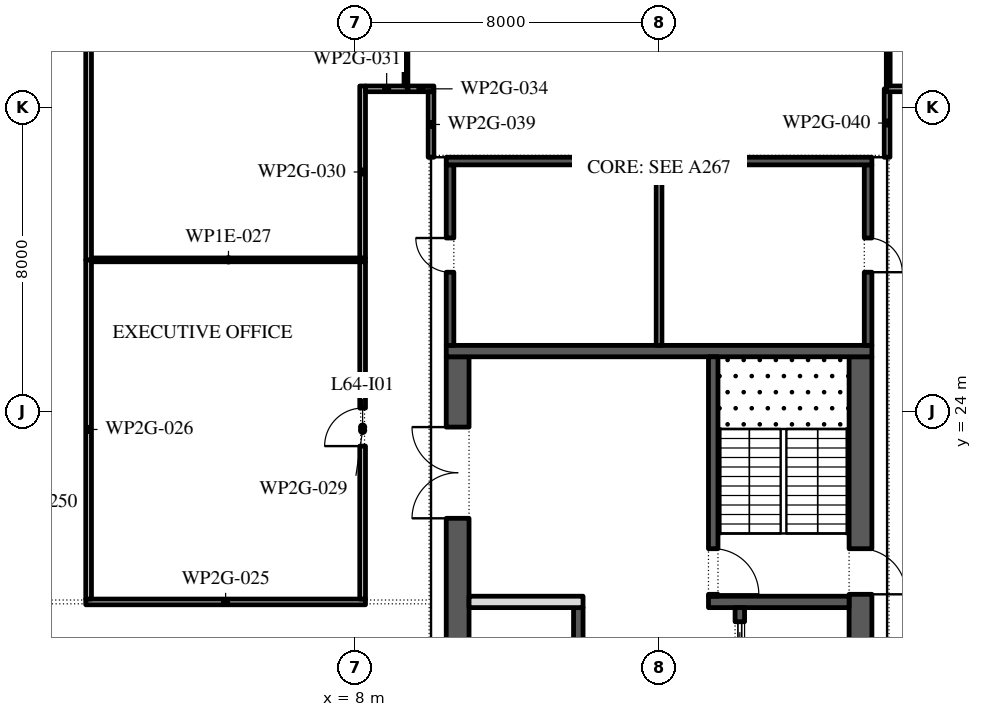
"""IFC4 building model, lengths in metres.
Left out: names, types, materials, properties, quantities, classifications, styles, units other than length and angle.
Written with IfcOpenShell. Run it as: python <this file> out.ifc"""

import sys

from ifc_helpers import new_model, si_unit, direction, frame, frame_2d, origin, place, context, subcontext, project, spatial, rectangle, extrude, element, fill, save


model = new_model("IFC4")
c1 = context("Model", 3, precision=1e-05, world=origin(), true_north=direction((0.0, 1.0)))
c2 = subcontext(c1, "Body", "Model", "MODEL_VIEW")
j1 = project(units=[si_unit("LENGTHUNIT", "METRE"), si_unit("PLANEANGLEUNIT", "RADIAN")], contexts=[c1])
p1 = place(None, origin())
s1 = spatial("IfcSite", under=j1, at=p1, CompositionType="ELEMENT")
p2 = place(p1, origin())
s2 = spatial("IfcBuilding", under=s1, at=p2, CompositionType="ELEMENT")
p3 = place(p2, frame((0.0, 0.0, 293.4)))
s3 = spatial("IfcBuildingStorey", under=s2, at=p3, CompositionType="ELEMENT", Elevation=293.4)
p4 = place(p3, frame((21.359, -11.678, 0.0), z_axis=(0.0, 0.0, 1.0), x_axis=(0.224949198343, 0.974370493275, 0.0)))
e1 = element("IfcWall", 1, at=p4, inside=s3, PredefinedType="STANDARD", context=c2, shape_type="SweptSolid", body=[
    extrude(rectangle(XDim=49.5, YDim=0.3, at=frame_2d((24.75, 0.0))), origin(), (0.0, 0.0, 1.0), 3.75),
])
p5 = place(p4, frame((0.907, 0.0, 0.45)))
e2 = element("IfcOpeningElement", 2, at=p5, cuts=e1, PredefinedType="OPENING", context=c2, shape_type="SweptSolid", body=[
    extrude(rectangle(XDim=5.0, YDim=3.25, at=frame_2d((2.5, 1.625))), frame((0.0, 0.16, 0.0), z_axis=(0.0, -1.0, 0.0), x_axis=(1.0, 0.0, 0.0)), (0.0, 0.0, 1.0), 0.32),
])
p6 = place(p4, frame((7.871, 0.0, 0.45)))
e3 = element("IfcOpeningElement", 3, at=p6, cuts=e1, PredefinedType="OPENING", context=c2, shape_type="SweptSolid", body=[
    extrude(rectangle(XDim=5.0, YDim=2.85, at=frame_2d((2.5, 1.425))), frame((0.0, 0.16, 0.0), z_axis=(0.0, -1.0, 0.0), x_axis=(1.0, 0.0, 0.0)), (0.0, 0.0, 1.0), 0.32),
])
p7 = place(p4, frame((14.986, 0.0, 0.45)))
e4 = element("IfcOpeningElement", 4, at=p7, cuts=e1, PredefinedType="OPENING", context=c2, shape_type="SweptSolid", body=[
    extrude(rectangle(XDim=5.0, YDim=2.85, at=frame_2d((2.5, 1.425))), frame((0.0, 0.16, 0.0), z_axis=(0.0, -1.0, 0.0), x_axis=(1.0, 0.0, 0.0)), (0.0, 0.0, 1.0), 0.32),
])
p8 = place(p4, frame((22.1, 0.0, 0.45)))
e5 = element("IfcOpeningElement", 5, at=p8, cuts=e1, PredefinedType="OPENING", context=c2, shape_type="SweptSolid", body=[
    extrude(rectangle(XDim=5.0, YDim=2.8, at=frame_2d((2.5, 1.4))), frame((0.0, 0.16, 0.0), z_axis=(0.0, -1.0, 0.0), x_axis=(1.0, 0.0, 0.0)), (0.0, 0.0, 1.0), 0.32),
])
p9 = place(p4, frame((29.214, 0.0, 0.45)))
e6 = element("IfcOpeningElement", 6, at=p9, cuts=e1, PredefinedType="OPENING", context=c2, shape_type="SweptSolid", body=[
    extrude(rectangle(XDim=5.0, YDim=2.7, at=frame_2d((2.5, 1.35))), frame((0.0, 0.16, 0.0), z_axis=(0.0, -1.0, 0.0), x_axis=(1.0, 0.0, 0.0)), (0.0, 0.0, 1.0), 0.32),
])
p10 = place(p4, frame((37.628, 0.0, 0.0)))
e7 = element("IfcOpeningElement", 7, at=p10, cuts=e1, PredefinedType="OPENING", context=c2, shape_type="SweptSolid", body=[
    extrude(rectangle(XDim=2.4, YDim=2.65, at=frame_2d((1.2, 1.325))), frame((0.0, 0.16, 0.0), z_axis=(0.0, -1.0, 0.0), x_axis=(1.0, 0.0, 0.0)), (0.0, 0.0, 1.0), 0.32),
])
p11 = place(p4, frame((43.443, 0.0, 0.45)))
e8 = element("IfcOpeningElement", 8, at=p11, cuts=e1, PredefinedType="OPENING", context=c2, shape_type="SweptSolid", body=[
    extrude(rectangle(XDim=5.0, YDim=3.25, at=frame_2d((2.5, 1.625))), frame((0.0, 0.16, 0.0), z_axis=(0.0, -1.0, 0.0), x_axis=(1.0, 0.0, 0.0)), (0.0, 0.0, 1.0), 0.32),
])
p12 = place(p3, frame((21.3, -2.45, 0.0), z_axis=(0.0, 0.0, 1.0), x_axis=(0.0, 1.0, 0.0)))
e9 = element("IfcWall", 9, at=p12, inside=s3, PredefinedType="SHEAR", context=c2, shape_type="SweptSolid", body=[
    extrude(rectangle(XDim=27.9, YDim=0.6, at=frame_2d((13.95, 0.0))), origin(), (0.0, 0.0, 1.0), 3.75),
])
p13 = place(p12, frame((5.05, 0.0, 0.0)))
e10 = element("IfcOpeningElement", 10, at=p13, cuts=e9, PredefinedType="OPENING", context=c2, shape_type="SweptSolid", body=[
    extrude(rectangle(XDim=1.2, YDim=2.1, at=frame_2d((0.6, 1.05))), frame((0.0, 0.31, 0.0), z_axis=(0.0, -1.0, 0.0), x_axis=(1.0, 0.0, 0.0)), (0.0, 0.0, 1.0), 0.62),
])
p14 = place(p12, frame((21.65, 0.0, 0.0)))
e11 = element("IfcOpeningElement", 11, at=p14, cuts=e9, PredefinedType="OPENING", context=c2, shape_type="SweptSolid", body=[
    extrude(rectangle(XDim=1.2, YDim=2.1, at=frame_2d((0.6, 1.05))), frame((0.0, 0.31, 0.0), z_axis=(0.0, -1.0, 0.0), x_axis=(1.0, 0.0, 0.0)), (0.0, 0.0, 1.0), 0.62),
])
p15 = place(p3, frame((10.7, -2.45, 0.0), z_axis=(0.0, 0.0, 1.0), x_axis=(0.0, 1.0, 0.0)))
e12 = element("IfcWall", 12, at=p15, inside=s3, PredefinedType="SHEAR", context=c2, shape_type="SweptSolid", body=[
    extrude(rectangle(XDim=27.9, YDim=0.6, at=frame_2d((13.95, 0.0))), origin(), (0.0, 0.0, 1.0), 3.75),
])
p16 = place(p15, frame((23.65, 0.0, 0.0)))
e13 = element("IfcOpeningElement", 13, at=p16, cuts=e12, PredefinedType="OPENING", context=c2, shape_type="SweptSolid", body=[
    extrude(rectangle(XDim=2.4, YDim=2.1, at=frame_2d((1.2, 1.05))), frame((0.0, 0.31, 0.0), z_axis=(0.0, -1.0, 0.0), x_axis=(1.0, 0.0, 0.0)), (0.0, 0.0, 1.0), 0.62),
])
p17 = place(p15, frame((1.087, 0.0, 0.0)))
e14 = element("IfcOpeningElement", 14, at=p17, cuts=e12, PredefinedType="OPENING", context=c2, shape_type="SweptSolid", body=[
    extrude(rectangle(XDim=0.9, YDim=2.1, at=frame_2d((0.45, 1.05))), frame((0.0, 0.31, 0.0), z_axis=(0.0, -1.0, 0.0), x_axis=(1.0, 0.0, 0.0)), (0.0, 0.0, 1.0), 0.62),
])
p18 = place(p15, frame((4.262, 0.0, 0.0)))
e15 = element("IfcOpeningElement", 15, at=p18, cuts=e12, PredefinedType="OPENING", context=c2, shape_type="SweptSolid", body=[
    extrude(rectangle(XDim=1.0, YDim=2.1, at=frame_2d((0.5, 1.05))), frame((0.0, 0.31, 0.0), z_axis=(0.0, -1.0, 0.0), x_axis=(1.0, 0.0, 0.0)), (0.0, 0.0, 1.0), 0.62),
])
p19 = place(p3, frame((10.4, 25.6, 0.0), z_axis=(0.0, 0.0, 1.0), x_axis=(1.0, 0.0, 0.0)))
e16 = element("IfcWall", 16, at=p19, inside=s3, PredefinedType="SHEAR", context=c2, shape_type="SweptSolid", body=[
    extrude(rectangle(XDim=11.2, YDim=0.3, at=frame_2d((5.6, 0.0))), origin(), (0.0, 0.0, 1.0), 3.75),
])
p20 = place(p3, frame((17.3, 19.0, 0.0), z_axis=(0.0, 0.0, 1.0), x_axis=(1.0, 0.0, 0.0)))
e17 = element("IfcWall", 17, at=p20, inside=s3, PredefinedType="SHEAR", context=c2, shape_type="SweptSolid", body=[
    extrude(rectangle(XDim=3.7, YDim=0.3, at=frame_2d((1.85, 0.0))), origin(), (0.0, 0.0, 1.0), 3.75),
])
p21 = place(p3, frame((17.425, 19.15, 0.0), z_axis=(0.0, 0.0, 1.0), x_axis=(0.0, 1.0, 0.0)))
e18 = element("IfcWall", 18, at=p21, inside=s3, PredefinedType="SHEAR", context=c2, shape_type="SweptSolid", body=[
    extrude(rectangle(XDim=6.3, YDim=0.25, at=frame_2d((3.15, 0.0))), origin(), (0.0, 0.0, 1.0), 3.75),
])
p22 = place(p21, frame((0.05, 0.0, 0.0)))
e19 = element("IfcOpeningElement", 19, at=p22, cuts=e18, PredefinedType="OPENING", context=c2, shape_type="SweptSolid", body=[
    extrude(rectangle(XDim=1.2, YDim=2.1, at=frame_2d((0.6, 1.05))), frame((0.0, 0.135, 0.0), z_axis=(0.0, -1.0, 0.0), x_axis=(1.0, 0.0, 0.0)), (0.0, 0.0, 1.0), 0.27),
])
p23 = place(p3, frame((18.125, 4.15, 0.0), z_axis=(0.0, 0.0, 1.0), x_axis=(0.0, 1.0, 0.0)))
e20 = element("IfcWall", 20, at=p23, inside=s3, PredefinedType="SHEAR", context=c2, shape_type="SweptSolid", body=[
    extrude(rectangle(XDim=14.7, YDim=0.25, at=frame_2d((7.35, 0.0))), origin(), (0.0, 0.0, 1.0), 3.75),
])
p24 = place(p23, frame((6.9, 0.0, 0.0)))
e21 = element("IfcOpeningElement", 21, at=p24, cuts=e20, PredefinedType="OPENING", context=c2, shape_type="SweptSolid", body=[
    extrude(rectangle(XDim=0.9, YDim=2.1, at=frame_2d((0.45, 1.05))), frame((0.0, 0.135, 0.0), z_axis=(0.0, -1.0, 0.0), x_axis=(1.0, 0.0, 0.0)), (0.0, 0.0, 1.0), 0.27),
])
p25 = place(p23, frame((0.371, 0.0, 0.0)))
e22 = element("IfcOpeningElement", 22, at=p25, cuts=e20, PredefinedType="OPENING", context=c2, shape_type="SweptSolid", body=[
    extrude(rectangle(XDim=1.1, YDim=2.1, at=frame_2d((0.55, 1.05))), frame((0.0, 0.135, 0.0), z_axis=(0.0, -1.0, 0.0), x_axis=(1.0, 0.0, 0.0)), (0.0, 0.0, 1.0), 0.27),
])
p26 = place(p23, frame((13.229, 0.0, 0.0)))
e23 = element("IfcOpeningElement", 23, at=p26, cuts=e20, PredefinedType="OPENING", context=c2, shape_type="SweptSolid", body=[
    extrude(rectangle(XDim=1.1, YDim=2.1, at=frame_2d((0.55, 1.05))), frame((0.0, 0.135, 0.0), z_axis=(0.0, -1.0, 0.0), x_axis=(1.0, 0.0, 0.0)), (0.0, 0.0, 1.0), 0.27),
])
p27 = place(p3, frame((13.875, -2.45, 0.0), z_axis=(0.0, 0.0, 1.0), x_axis=(0.0, 1.0, 0.0)))
e24 = element("IfcWall", 24, at=p27, inside=s3, PredefinedType="SHEAR", context=c2, shape_type="SweptSolid", body=[
    extrude(rectangle(XDim=21.3, YDim=0.25, at=frame_2d((10.65, 0.0))), origin(), (0.0, 0.0, 1.0), 3.75),
])
p28 = place(p27, frame((17.786, 0.0, 0.0)))
e25 = element("IfcOpeningElement", 25, at=p28, cuts=e24, PredefinedType="OPENING", context=c2, shape_type="SweptSolid", body=[
    extrude(rectangle(XDim=0.9, YDim=2.1, at=frame_2d((0.45, 1.05))), frame((0.0, 0.135, 0.0), z_axis=(0.0, -1.0, 0.0), x_axis=(1.0, 0.0, 0.0)), (0.0, 0.0, 1.0), 0.27),
])
p29 = place(p27, frame((6.971, 0.0, 0.0)))
e26 = element("IfcOpeningElement", 26, at=p29, cuts=e24, PredefinedType="OPENING", context=c2, shape_type="SweptSolid", body=[
    extrude(rectangle(XDim=1.1, YDim=2.1, at=frame_2d((0.55, 1.05))), frame((0.0, 0.135, 0.0), z_axis=(0.0, -1.0, 0.0), x_axis=(1.0, 0.0, 0.0)), (0.0, 0.0, 1.0), 0.27),
])
p30 = place(p27, frame((9.114, 0.0, 0.0)))
e27 = element("IfcOpeningElement", 27, at=p30, cuts=e24, PredefinedType="OPENING", context=c2, shape_type="SweptSolid", body=[
    extrude(rectangle(XDim=1.1, YDim=2.1, at=frame_2d((0.55, 1.05))), frame((0.0, 0.135, 0.0), z_axis=(0.0, -1.0, 0.0), x_axis=(1.0, 0.0, 0.0)), (0.0, 0.0, 1.0), 0.27),
])
p31 = place(p27, frame((11.257, 0.0, 0.0)))
e28 = element("IfcOpeningElement", 28, at=p31, cuts=e24, PredefinedType="OPENING", context=c2, shape_type="SweptSolid", body=[
    extrude(rectangle(XDim=1.1, YDim=2.1, at=frame_2d((0.55, 1.05))), frame((0.0, 0.135, 0.0), z_axis=(0.0, -1.0, 0.0), x_axis=(1.0, 0.0, 0.0)), (0.0, 0.0, 1.0), 0.27),
])
p32 = place(p27, frame((13.4, 0.0, 0.0)))
e29 = element("IfcOpeningElement", 29, at=p32, cuts=e24, PredefinedType="OPENING", context=c2, shape_type="SweptSolid", body=[
    extrude(rectangle(XDim=1.1, YDim=2.1, at=frame_2d((0.55, 1.05))), frame((0.0, 0.135, 0.0), z_axis=(0.0, -1.0, 0.0), x_axis=(1.0, 0.0, 0.0)), (0.0, 0.0, 1.0), 0.27),
])
p33 = place(p3, frame((11.0, 19.0, 0.0), z_axis=(0.0, 0.0, 1.0), x_axis=(1.0, 0.0, 0.0)))
e30 = element("IfcWall", 30, at=p33, inside=s3, PredefinedType="PARTITIONING", context=c2, shape_type="SweptSolid", body=[
    extrude(rectangle(XDim=3.0, YDim=0.3, at=frame_2d((1.5, 0.0))), origin(), (0.0, 0.0, 1.0), 3.75),
])
p34 = place(p3, frame((21.5, 25.75, 0.0), z_axis=(0.0, 0.0, 1.0), x_axis=(0.0, 1.0, 0.0)))
e31 = element("IfcWall", 31, at=p34, inside=s3, PredefinedType="SHEAR", context=c2, shape_type="SweptSolid", body=[
    extrude(rectangle(XDim=4.75, YDim=0.2, at=frame_2d((2.375, 0.0))), origin(), (0.0, 0.0, 1.0), 3.75),
])
p35 = place(p34, frame((1.925, 0.0, 0.0)))
e32 = element("IfcOpeningElement", 32, at=p35, cuts=e31, PredefinedType="OPENING", context=c2, shape_type="SweptSolid", body=[
    extrude(rectangle(XDim=0.9, YDim=2.1, at=frame_2d((0.45, 1.05))), frame((0.0, 0.11, 0.0), z_axis=(0.0, -1.0, 0.0), x_axis=(1.0, 0.0, 0.0)), (0.0, 0.0, 1.0), 0.22),
])
p36 = place(p3, frame((10.5, 25.75, 0.0), z_axis=(0.0, 0.0, 1.0), x_axis=(0.0, 1.0, 0.0)))
e33 = element("IfcWall", 33, at=p36, inside=s3, PredefinedType="SHEAR", context=c2, shape_type="SweptSolid", body=[
    extrude(rectangle(XDim=4.75, YDim=0.2, at=frame_2d((2.375, 0.0))), origin(), (0.0, 0.0, 1.0), 3.75),
])
p37 = place(p36, frame((1.925, 0.0, 0.0)))
e34 = element("IfcOpeningElement", 34, at=p37, cuts=e33, PredefinedType="OPENING", context=c2, shape_type="SweptSolid", body=[
    extrude(rectangle(XDim=0.9, YDim=2.1, at=frame_2d((0.45, 1.05))), frame((0.0, 0.11, 0.0), z_axis=(0.0, -1.0, 0.0), x_axis=(1.0, 0.0, 0.0)), (0.0, 0.0, 1.0), 0.22),
])
p38 = place(p3, frame((10.4, 30.6, 0.0), z_axis=(0.0, 0.0, 1.0), x_axis=(1.0, 0.0, 0.0)))
e35 = element("IfcWall", 35, at=p38, inside=s3, PredefinedType="SHEAR", context=c2, shape_type="SweptSolid", body=[
    extrude(rectangle(XDim=11.2, YDim=0.2, at=frame_2d((5.6, 0.0))), origin(), (0.0, 0.0, 1.0), 3.75),
])
p39 = place(p3, frame((16.0, 25.75, 0.0), z_axis=(0.0, 0.0, 1.0), x_axis=(0.0, 1.0, 0.0)))
e36 = element("IfcWall", 36, at=p39, inside=s3, PredefinedType="PARTITIONING", context=c2, shape_type="SweptSolid", body=[
    extrude(rectangle(XDim=4.75, YDim=0.15, at=frame_2d((2.375, 0.0))), origin(), (0.0, 0.0, 1.0), 3.75),
])
p40 = place(p3, frame((0.915, 19.0, 0.0), z_axis=(0.0, 0.0, 1.0), x_axis=(1.0, 0.0, 0.0)))
e37 = element("IfcWall", 37, at=p40, inside=s3, PredefinedType="PARTITIONING", context=c2, shape_type="SweptSolid", body=[
    extrude(rectangle(XDim=7.36, YDim=0.15, at=frame_2d((3.68, 0.0))), origin(), (0.0, 0.0, 1.0), 3.75),
])
p41 = place(p3, frame((0.99, 28.0, 0.0), z_axis=(0.0, 0.0, 1.0), x_axis=(0.0, -1.0, 0.0)))
e38 = element("IfcWall", 38, at=p41, inside=s3, PredefinedType="PARTITIONING", context=c2, shape_type="SweptSolid", body=[
    extrude(rectangle(XDim=8.925, YDim=0.15, at=frame_2d((4.462, 0.0))), origin(), (0.0, 0.0, 1.0), 3.75),
])
p42 = place(p3, frame((1.065, 28.0, 0.0), z_axis=(0.0, 0.0, 1.0), x_axis=(1.0, 0.0, 0.0)))
e39 = element("IfcWall", 39, at=p42, inside=s3, PredefinedType="PARTITIONING", context=c2, shape_type="SweptSolid", body=[
    extrude(rectangle(XDim=7.21, YDim=0.1, at=frame_2d((3.605, 0.0))), origin(), (0.0, 0.0, 1.0), 3.75),
])
p43 = place(p3, frame((0.99, 47.296, 0.0), z_axis=(0.0, 0.0, 1.0), x_axis=(0.0, -1.0, 0.0)))
e40 = element("IfcWall", 40, at=p43, inside=s3, PredefinedType="PARTITIONING", context=c2, shape_type="SweptSolid", body=[
    extrude(rectangle(XDim=19.296, YDim=0.15, at=frame_2d((9.648, 0.0))), origin(), (0.0, 0.0, 1.0), 3.75),
])
p44 = place(p43, frame((7.146, 0.0, 0.0)))
e41 = element("IfcOpeningElement", 41, at=p44, cuts=e40, PredefinedType="OPENING", context=c2, shape_type="SweptSolid", body=[
    extrude(rectangle(XDim=1.0, YDim=2.1, at=frame_2d((0.5, 1.05))), frame((0.0, 0.085, 0.0), z_axis=(0.0, -1.0, 0.0), x_axis=(1.0, 0.0, 0.0)), (0.0, 0.0, 1.0), 0.17),
])
p45 = place(p3, frame((8.2, 19.075, 0.0), z_axis=(0.0, 0.0, 1.0), x_axis=(0.0, 1.0, 0.0)))
e42 = element("IfcWall", 42, at=p45, inside=s3, PredefinedType="PARTITIONING", context=c2, shape_type="SweptSolid", body=[
    extrude(rectangle(XDim=8.875, YDim=0.15, at=frame_2d((4.438, 0.0))), origin(), (0.0, 0.0, 1.0), 3.75),
])
p46 = place(p45, frame((4.025, 0.0, 0.0)))
e43 = element("IfcOpeningElement", 43, at=p46, cuts=e42, PredefinedType="OPENING", context=c2, shape_type="SweptSolid", body=[
    extrude(rectangle(XDim=1.0, YDim=2.1, at=frame_2d((0.5, 1.05))), frame((0.0, 0.085, 0.0), z_axis=(0.0, -1.0, 0.0), x_axis=(1.0, 0.0, 0.0)), (0.0, 0.0, 1.0), 0.17),
])
p47 = place(p3, frame((8.2, 28.05, 0.0), z_axis=(0.0, 0.0, 1.0), x_axis=(0.0, 1.0, 0.0)))
e44 = element("IfcWall", 44, at=p47, inside=s3, PredefinedType="PARTITIONING", context=c2, shape_type="SweptSolid", body=[
    extrude(rectangle(XDim=4.525, YDim=0.15, at=frame_2d((2.262, 0.0))), origin(), (0.0, 0.0, 1.0), 3.75),
])
p48 = place(p3, frame((8.275, 32.5, 0.0), z_axis=(0.0, 0.0, 1.0), x_axis=(1.0, 0.0, 0.0)))
e45 = element("IfcWall", 45, at=p48, inside=s3, PredefinedType="PARTITIONING", context=c2, shape_type="SweptSolid", body=[
    extrude(rectangle(XDim=1.115, YDim=0.15, at=frame_2d((0.558, 0.0))), origin(), (0.0, 0.0, 1.0), 3.75),
])
p49 = place(p3, frame((9.39, 32.5, 0.0), z_axis=(0.0, 0.0, 1.0), x_axis=(1.0, 0.0, 0.0)))
e46 = element("IfcWall", 46, at=p49, inside=s3, PredefinedType="PARTITIONING", context=c2, shape_type="SweptSolid", body=[
    extrude(rectangle(XDim=0.685, YDim=0.15, at=frame_2d((0.343, 0.0))), origin(), (0.0, 0.0, 1.0), 3.75),
])
p50 = place(p3, frame((9.34, 37.45, 0.0), z_axis=(0.0, 0.0, 1.0), x_axis=(0.0, -1.0, 0.0)))
e47 = element("IfcWall", 47, at=p50, inside=s3, PredefinedType="PARTITIONING", context=c2, shape_type="SweptSolid", body=[
    extrude(rectangle(XDim=4.875, YDim=0.1, at=frame_2d((2.438, 0.0))), origin(), (0.0, 0.0, 1.0), 3.75),
])
p51 = place(p50, frame((1.1, 0.0, 0.0)))
e48 = element("IfcOpeningElement", 48, at=p51, cuts=e47, PredefinedType="OPENING", context=c2, shape_type="SweptSolid", body=[
    extrude(rectangle(XDim=0.9, YDim=2.1, at=frame_2d((0.45, 1.05))), frame((0.0, 0.06, 0.0), z_axis=(0.0, -1.0, 0.0), x_axis=(1.0, 0.0, 0.0)), (0.0, 0.0, 1.0), 0.12),
])
p52 = place(p3, frame((10.0, 32.425, 0.0), z_axis=(0.0, 0.0, 1.0), x_axis=(0.0, -1.0, 0.0)))
e49 = element("IfcWall", 49, at=p52, inside=s3, PredefinedType="PARTITIONING", context=c2, shape_type="SweptSolid", body=[
    extrude(rectangle(XDim=1.725, YDim=0.15, at=frame_2d((0.863, 0.0))), origin(), (0.0, 0.0, 1.0), 3.75),
])
p53 = place(p3, frame((22.0, 30.7, 0.0), z_axis=(0.0, 0.0, 1.0), x_axis=(0.0, 1.0, 0.0)))
e50 = element("IfcWall", 50, at=p53, inside=s3, PredefinedType="PARTITIONING", context=c2, shape_type="SweptSolid", body=[
    extrude(rectangle(XDim=1.8, YDim=0.15, at=frame_2d((0.9, 0.0))), origin(), (0.0, 0.0, 1.0), 3.75),
])
p54 = place(p3, frame((21.98, 32.5, 0.0), z_axis=(0.0, 0.0, 1.0), x_axis=(1.0, 0.0, 0.0)))
e51 = element("IfcWall", 51, at=p54, inside=s3, PredefinedType="PARTITIONING", context=c2, shape_type="SweptSolid", body=[
    extrude(rectangle(XDim=1.895, YDim=0.15, at=frame_2d((0.948, 0.0))), origin(), (0.0, 0.0, 1.0), 3.75),
])
p55 = place(p3, frame((22.03, 35.12, 0.0), z_axis=(0.0, 0.0, 1.0), x_axis=(0.0, -1.0, 0.0)))
e52 = element("IfcWall", 52, at=p55, inside=s3, PredefinedType="PARTITIONING", context=c2, shape_type="SweptSolid", body=[
    extrude(rectangle(XDim=2.545, YDim=0.1, at=frame_2d((1.272, 0.0))), origin(), (0.0, 0.0, 1.0), 3.75),
])
p56 = place(p26, origin())
e53 = element("IfcDoor", 53, at=p56, inside=s3, OperationType="SLIDING_TO_LEFT", PredefinedType="DOOR", context=c2, shape_type="SweptSolid", body=[
    extrude(rectangle(XDim=1.1, YDim=2.1, at=frame_2d((0.55, 1.05))), frame((0.0, 0.025, 0.0), z_axis=(0.0, -1.0, 0.0), x_axis=(1.0, 0.0, 0.0)), (0.0, 0.0, 1.0), 0.05),
])
fill(e23, e53)
p57 = place(p16, origin())
e54 = element("IfcDoor", 54, at=p57, inside=s3, OperationType="DOUBLE_DOOR_SINGLE_SWING", PredefinedType="DOOR", context=c2, shape_type="SweptSolid", body=[
    extrude(rectangle(XDim=2.4, YDim=2.1, at=frame_2d((1.2, 1.05))), frame((0.0, 0.025, 0.0), z_axis=(0.0, -1.0, 0.0), x_axis=(1.0, 0.0, 0.0)), (0.0, 0.0, 1.0), 0.05),
])
fill(e13, e54)
p58 = place(p22, frame((1.2, 0.0, 0.0), z_axis=(0.0, 0.0, 1.0), x_axis=(-1.0, 0.0, 0.0)))
e55 = element("IfcDoor", 55, at=p58, inside=s3, OperationType="SINGLE_SWING_LEFT", PredefinedType="DOOR", context=c2, shape_type="SweptSolid", body=[
    extrude(rectangle(XDim=1.2, YDim=2.1, at=frame_2d((0.6, 1.05))), frame((0.0, 0.025, 0.0), z_axis=(0.0, -1.0, 0.0), x_axis=(1.0, 0.0, 0.0)), (0.0, 0.0, 1.0), 0.05),
])
fill(e19, e55)
p59 = place(p14, frame((1.2, 0.0, 0.0), z_axis=(0.0, 0.0, 1.0), x_axis=(-1.0, 0.0, 0.0)))
e56 = element("IfcDoor", 56, at=p59, inside=s3, OperationType="SINGLE_SWING_LEFT", PredefinedType="DOOR", context=c2, shape_type="SweptSolid", body=[
    extrude(rectangle(XDim=1.2, YDim=2.1, at=frame_2d((0.6, 1.05))), frame((0.0, 0.025, 0.0), z_axis=(0.0, -1.0, 0.0), x_axis=(1.0, 0.0, 0.0)), (0.0, 0.0, 1.0), 0.05),
])
fill(e11, e56)
p60 = place(p35, frame((0.9, 0.15, 0.0), z_axis=(0.0, 0.0, 1.0), x_axis=(-1.0, 0.0, 0.0)))
e57 = element("IfcDoor", 57, at=p60, inside=s3, OperationType="SINGLE_SWING_LEFT", PredefinedType="DOOR", context=c2, shape_type="SweptSolid", body=[
    extrude(rectangle(XDim=0.9, YDim=2.1, at=frame_2d((0.45, 1.05))), frame((0.0, 0.1, 0.0), z_axis=(0.0, -1.0, 0.0), x_axis=(1.0, 0.0, 0.0)), (0.0, 0.0, 1.0), 0.05),
])
fill(e32, e57)
p61 = place(p37, origin())
e58 = element("IfcDoor", 58, at=p61, inside=s3, OperationType="SINGLE_SWING_LEFT", PredefinedType="DOOR", context=c2, shape_type="SweptSolid", body=[
    extrude(rectangle(XDim=0.9, YDim=2.1, at=frame_2d((0.45, 1.05))), frame((0.0, -0.05, 0.0), z_axis=(0.0, -1.0, 0.0), x_axis=(1.0, 0.0, 0.0)), (0.0, 0.0, 1.0), 0.05),
])
fill(e34, e58)
p62 = place(p46, origin())
e59 = element("IfcDoor", 59, at=p62, inside=s3, OperationType="SINGLE_SWING_RIGHT", PredefinedType="DOOR", context=c2, shape_type="SweptSolid", body=[
    extrude(rectangle(XDim=1.0, YDim=2.1, at=frame_2d((0.5, 1.05))), frame((0.0, 0.025, 0.0), z_axis=(0.0, -1.0, 0.0), x_axis=(1.0, 0.0, 0.0)), (0.0, 0.0, 1.0), 0.05),
])
fill(e43, e59)
save(model, sys.argv[1])
